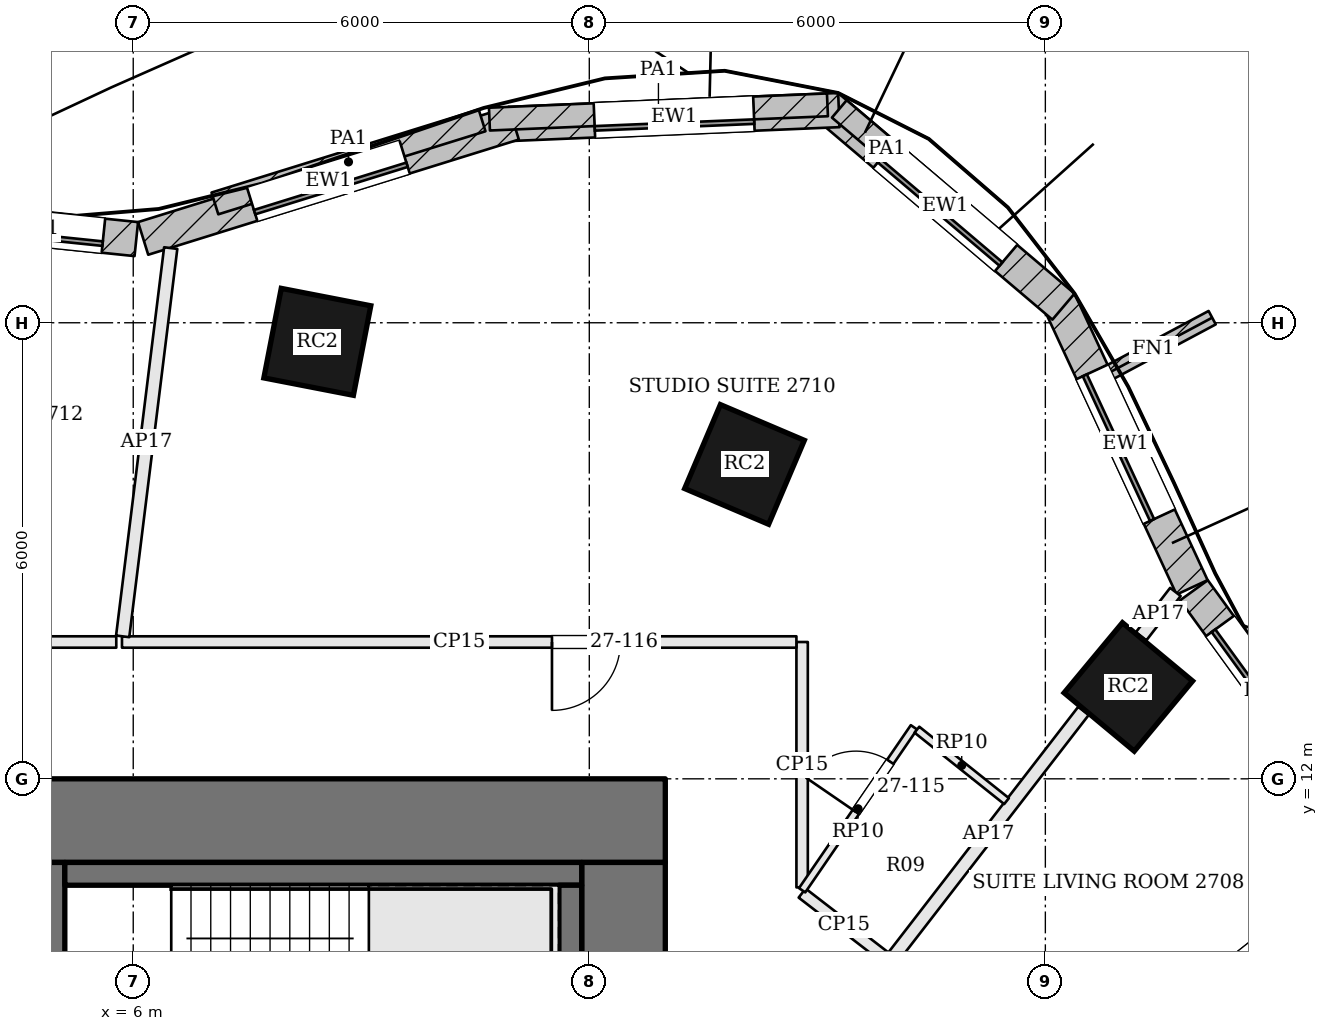
"""IFC4 building model, lengths in metres.
Left out: names, types, materials, properties, quantities, classifications, styles, units other than length and angle.
Written with IfcOpenShell. Run it as: python <this file> out.ifc"""

import sys

from ifc_helpers import new_model, si_unit, direction, frame, frame_2d, origin, origin_2d, place, context, subcontext, project, spatial, rectangle, extrude, element, fill, save


model = new_model("IFC4")
c1 = context("Model", 3, precision=1e-05, world=origin(), true_north=direction((0.0, 1.0)))
c2 = subcontext(c1, "Body", "Model", "MODEL_VIEW")
j1 = project(units=[si_unit("LENGTHUNIT", "METRE"), si_unit("PLANEANGLEUNIT", "RADIAN")], contexts=[c1])
p1 = place(None, origin())
s1 = spatial("IfcSite", under=j1, at=p1, CompositionType="ELEMENT")
p2 = place(p1, origin())
s2 = spatial("IfcBuilding", under=s1, at=p2, CompositionType="ELEMENT")
p3 = place(p2, frame((0.0, 0.0, 114.0)))
s3 = spatial("IfcBuildingStorey", under=s2, at=p3, CompositionType="ELEMENT", Elevation=114.0)
p4 = place(p3, frame((-13.0, 11.45, 0.0), z_axis=(0.0, 0.0, 1.0), x_axis=(1.0, 0.0, 0.0)))
e1 = element("IfcWall", 1, at=p4, inside=s3, PredefinedType="SHEAR", context=c2, shape_type="SweptSolid", body=[
    extrude(rectangle(XDim=26.0, YDim=1.1, at=frame_2d((13.0, 0.0))), origin(), (0.0, 0.0, 1.0), 3.6),
])
p5 = place(p4, frame((9.225, 0.0, 0.0)))
e2 = element("IfcOpeningElement", 2, at=p5, cuts=e1, PredefinedType="OPENING", context=c2, shape_type="SweptSolid", body=[
    extrude(rectangle(XDim=1.0, YDim=2.1, at=frame_2d((0.5, 1.05))), frame((0.0, 0.56, 0.0), z_axis=(0.0, -1.0, 0.0), x_axis=(1.0, 0.0, 0.0)), (0.0, 0.0, 1.0), 1.12),
])
p6 = place(p4, frame((11.825, 0.0, 0.0)))
e3 = element("IfcOpeningElement", 3, at=p6, cuts=e1, PredefinedType="OPENING", context=c2, shape_type="SweptSolid", body=[
    extrude(rectangle(XDim=0.7, YDim=2.1, at=frame_2d((0.35, 1.05))), frame((0.0, 0.56, 0.0), z_axis=(0.0, -1.0, 0.0), x_axis=(1.0, 0.0, 0.0)), (0.0, 0.0, 1.0), 1.12),
])
p7 = place(p4, frame((13.725, 0.0, 0.0)))
e4 = element("IfcOpeningElement", 4, at=p7, cuts=e1, PredefinedType="OPENING", context=c2, shape_type="SweptSolid", body=[
    extrude(rectangle(XDim=1.0, YDim=2.1, at=frame_2d((0.5, 1.05))), frame((0.0, 0.56, 0.0), z_axis=(0.0, -1.0, 0.0), x_axis=(1.0, 0.0, 0.0)), (0.0, 0.0, 1.0), 1.12),
])
p8 = place(p4, frame((16.225, 0.0, 0.0)))
e5 = element("IfcOpeningElement", 5, at=p8, cuts=e1, PredefinedType="OPENING", context=c2, shape_type="SweptSolid", body=[
    extrude(rectangle(XDim=0.9, YDim=2.1, at=frame_2d((0.45, 1.05))), frame((0.0, 0.56, 0.0), z_axis=(0.0, -1.0, 0.0), x_axis=(1.0, 0.0, 0.0)), (0.0, 0.0, 1.0), 1.12),
])
p9 = place(p3, frame((12.45, -1.9, 0.0), z_axis=(0.0, 0.0, 1.0), x_axis=(0.0, 1.0, 0.0)))
e6 = element("IfcWall", 6, at=p9, inside=s3, PredefinedType="SHEAR", context=c2, shape_type="SweptSolid", body=[
    extrude(rectangle(XDim=12.8, YDim=1.1, at=frame_2d((6.4, 0.0))), origin(), (0.0, 0.0, 1.0), 3.6),
])
p10 = place(p9, frame((7.1, 0.0, 0.0)))
e7 = element("IfcOpeningElement", 7, at=p10, cuts=e6, PredefinedType="OPENING", context=c2, shape_type="SweptSolid", body=[
    extrude(rectangle(XDim=1.8, YDim=2.1, at=frame_2d((0.9, 1.05))), frame((0.0, 0.56, 0.0), z_axis=(0.0, -1.0, 0.0), x_axis=(1.0, 0.0, 0.0)), (0.0, 0.0, 1.0), 1.12),
])
for number, where, z_axis, x_axis in (
    (8, (19.092, 13.209, 0.0), (0.0, 0.0, 1.0), (-0.769, 0.639, 0.0)),
    (9, (14.042, 16.136, 0.0), (0.0, 0.0, 1.0), (-0.92, 0.392, 0.0)),
    (10, (8.422, 17.749, 0.0), (0.0, 0.0, 1.0), (-0.982, 0.191, 0.0)),
):
    element("IfcColumn", number, at=place(p3, frame(where, z_axis=z_axis, x_axis=x_axis)), inside=s3, PredefinedType="COLUMN", context=c2, shape_type="SweptSolid", body=[
        extrude(rectangle(XDim=1.2, YDim=1.2, at=origin_2d()), origin(), (0.0, 0.0, 1.0), 3.6),
    ])
p11 = place(p3, frame((21.872, 11.841, 0.0), z_axis=(0.0, 0.0, 1.0), x_axis=(-0.587562050363, 0.809179113036, 0.0)))
e11 = element("IfcWall", 11, at=p11, inside=s3, PredefinedType="SOLIDWALL", context=c2, shape_type="SweptSolid", body=[
    extrude(rectangle(XDim=3.263, YDim=0.45, at=frame_2d((1.631, 0.0))), origin(), (0.0, 0.0, 1.0), 3.4),
])
p12 = place(p11, frame((0.582, 0.0, 0.9)))
e12 = element("IfcOpeningElement", 12, at=p12, cuts=e11, PredefinedType="OPENING", context=c2, shape_type="SweptSolid", body=[
    extrude(rectangle(XDim=2.1, YDim=2.0, at=frame_2d((1.05, 1.0))), frame((0.0, 0.235, 0.0), z_axis=(0.0, -1.0, 0.0), x_axis=(1.0, 0.0, 0.0)), (0.0, 0.0, 1.0), 0.47),
])
p13 = place(p3, frame((19.931, 14.519, 0.0), z_axis=(0.0, 0.0, 1.0), x_axis=(-0.421138964136, 0.906996126169, 0.0)))
e13 = element("IfcWall", 13, at=p13, inside=s3, PredefinedType="SOLIDWALL", context=c2, shape_type="SweptSolid", body=[
    extrude(rectangle(XDim=4.15, YDim=0.45, at=frame_2d((2.075, 0.0))), origin(), (0.0, 0.0, 1.0), 3.4),
])
p14 = place(p13, frame((1.025, 0.0, 0.9)))
e14 = element("IfcOpeningElement", 14, at=p14, cuts=e13, PredefinedType="OPENING", context=c2, shape_type="SweptSolid", body=[
    extrude(rectangle(XDim=2.1, YDim=2.0, at=frame_2d((1.05, 1.0))), frame((0.0, 0.235, 0.0), z_axis=(0.0, -1.0, 0.0), x_axis=(1.0, 0.0, 0.0)), (0.0, 0.0, 1.0), 0.47),
])
p15 = place(p3, frame((18.238, 18.212, 0.0), z_axis=(0.0, 0.0, 1.0), x_axis=(-0.762479604733, 0.647012250554, 0.0)))
e15 = element("IfcWall", 15, at=p15, inside=s3, PredefinedType="SOLIDWALL", context=c2, shape_type="SweptSolid", body=[
    extrude(rectangle(XDim=4.079, YDim=0.45, at=frame_2d((2.039, 0.0))), origin(), (0.0, 0.0, 1.0), 3.4),
])
p16 = place(p15, frame((0.99, 0.0, 0.9)))
e16 = element("IfcOpeningElement", 16, at=p16, cuts=e15, PredefinedType="OPENING", context=c2, shape_type="SweptSolid", body=[
    extrude(rectangle(XDim=2.1, YDim=2.0, at=frame_2d((1.05, 1.0))), frame((0.0, 0.235, 0.0), z_axis=(0.0, -1.0, 0.0), x_axis=(1.0, 0.0, 0.0)), (0.0, 0.0, 1.0), 0.47),
])
p17 = place(p3, frame((15.283, 20.798, 0.0), z_axis=(0.0, 0.0, 1.0), x_axis=(-0.999108814386, -0.042208731526, 0.0)))
e17 = element("IfcWall", 17, at=p17, inside=s3, PredefinedType="SOLIDWALL", context=c2, shape_type="SweptSolid", body=[
    extrude(rectangle(XDim=4.338, YDim=0.45, at=frame_2d((2.169, 0.0))), origin(), (0.0, 0.0, 1.0), 3.4),
])
p18 = place(p17, frame((1.119, 0.0, 0.9)))
e18 = element("IfcOpeningElement", 18, at=p18, cuts=e17, PredefinedType="OPENING", context=c2, shape_type="SweptSolid", body=[
    extrude(rectangle(XDim=2.1, YDim=2.0, at=frame_2d((1.05, 1.0))), frame((0.0, 0.235, 0.0), z_axis=(0.0, -1.0, 0.0), x_axis=(1.0, 0.0, 0.0)), (0.0, 0.0, 1.0), 0.47),
])
p19 = place(p3, frame((11.007, 20.625, 0.0), z_axis=(0.0, 0.0, 1.0), x_axis=(-0.954949254112, -0.296769139352, 0.0)))
e19 = element("IfcWall", 19, at=p19, inside=s3, PredefinedType="SOLIDWALL", context=c2, shape_type="SweptSolid", body=[
    extrude(rectangle(XDim=5.106, YDim=0.45, at=frame_2d((2.553, 0.0))), origin(), (0.0, 0.0, 1.0), 3.4),
])
p20 = place(p19, frame((1.503, 0.0, 0.9)))
e20 = element("IfcOpeningElement", 20, at=p20, cuts=e19, PredefinedType="OPENING", context=c2, shape_type="SweptSolid", body=[
    extrude(rectangle(XDim=2.1, YDim=2.0, at=frame_2d((1.05, 1.0))), frame((0.0, 0.235, 0.0), z_axis=(0.0, -1.0, 0.0), x_axis=(1.0, 0.0, 0.0)), (0.0, 0.0, 1.0), 0.47),
])
p21 = place(p3, frame((6.04, 19.101, 0.0), z_axis=(0.0, 0.0, 1.0), x_axis=(-0.994675968472, 0.103052014752, 0.0)))
e21 = element("IfcWall", 21, at=p21, inside=s3, PredefinedType="SOLIDWALL", context=c2, shape_type="SweptSolid", body=[
    extrude(rectangle(XDim=2.67, YDim=0.45, at=frame_2d((1.335, 0.0))), origin(), (0.0, 0.0, 1.0), 3.4),
])
p22 = place(p21, frame((0.435, 0.0, 0.9)))
e22 = element("IfcOpeningElement", 22, at=p22, cuts=e21, PredefinedType="OPENING", context=c2, shape_type="SweptSolid", body=[
    extrude(rectangle(XDim=1.8, YDim=2.0, at=frame_2d((0.9, 1.0))), frame((0.0, 0.235, 0.0), z_axis=(0.0, -1.0, 0.0), x_axis=(1.0, 0.0, 0.0)), (0.0, 0.0, 1.0), 0.47),
])
p23 = place(p3, frame((18.651, 17.243, 0.0), z_axis=(0.0, 0.0, 1.0), x_axis=(0.882225472329, 0.470827161466, 0.0)))
e23 = element("IfcWall", 23, at=p23, inside=s3, PredefinedType="SOLIDWALL", context=c2, shape_type="SweptSolid", body=[
    extrude(rectangle(XDim=1.75, YDim=0.2, at=frame_2d((0.875, 0.0))), origin(), (0.0, 0.0, 1.0), 3.4),
])
p24 = place(p3, frame((16.542, 19.75, 3.6), z_axis=(0.0, 0.0, 1.0), x_axis=(-0.762426907318, 0.647074347349, 0.0)))
e24 = element("IfcWall", 24, at=p24, inside=s3, PredefinedType="PARAPET", context=c2, shape_type="SweptSolid", body=[
    extrude(rectangle(XDim=1.642, YDim=0.3, at=frame_2d((0.821, 0.0))), origin(), (0.0, 0.0, 1.0), 1.1),
])
p25 = place(p3, frame((15.133, 20.867, 3.6), z_axis=(0.0, 0.0, 1.0), x_axis=(-0.999109914186, -0.042182690458, 0.0)))
e25 = element("IfcWall", 25, at=p25, inside=s3, PredefinedType="PARAPET", context=c2, shape_type="SweptSolid", body=[
    extrude(rectangle(XDim=4.451, YDim=0.3, at=frame_2d((2.225, 0.0))), origin(), (0.0, 0.0, 1.0), 1.1),
])
p26 = place(p3, frame((10.59, 20.662, 3.6), z_axis=(0.0, 0.0, 1.0), x_axis=(-0.954933257017, -0.296820610207, 0.0)))
e26 = element("IfcWall", 26, at=p26, inside=s3, PredefinedType="PARAPET", context=c2, shape_type="SweptSolid", body=[
    extrude(rectangle(XDim=3.681, YDim=0.3, at=frame_2d((1.84, 0.0))), origin(), (0.0, 0.0, 1.0), 1.1),
])
p27 = place(p3, frame((4.975, 10.9, 0.0), z_axis=(0.0, 0.0, 1.0), x_axis=(0.0, -1.0, 0.0)))
e27 = element("IfcWall", 27, at=p27, inside=s3, PredefinedType="SOLIDWALL", context=c2, shape_type="SweptSolid", body=[
    extrude(rectangle(XDim=12.8, YDim=0.25, at=frame_2d((6.4, 0.0))), origin(), (0.0, 0.0, 1.0), 3.4),
])
p28 = place(p27, frame((4.95, 0.0, 0.0)))
e28 = element("IfcOpeningElement", 28, at=p28, cuts=e27, PredefinedType="OPENING", context=c2, shape_type="SweptSolid", body=[
    extrude(rectangle(XDim=1.2, YDim=2.1, at=frame_2d((0.6, 1.05))), frame((0.0, 0.135, 0.0), z_axis=(0.0, -1.0, 0.0), x_axis=(1.0, 0.0, 0.0)), (0.0, 0.0, 1.0), 0.27),
])
p29 = place(p3, frame((11.9, 10.75, 0.0), z_axis=(0.0, 0.0, 1.0), x_axis=(-1.0, 0.0, 0.0)))
e29 = element("IfcWall", 29, at=p29, inside=s3, PredefinedType="SOLIDWALL", context=c2, shape_type="SweptSolid", body=[
    extrude(rectangle(XDim=6.8, YDim=0.3, at=frame_2d((3.4, 0.0))), origin(), (0.0, 0.0, 1.0), 3.4),
])
p30 = place(p3, frame((11.75, 10.6, 0.0), z_axis=(0.0, 0.0, 1.0), x_axis=(0.0, -1.0, 0.0)))
e30 = element("IfcWall", 30, at=p30, inside=s3, PredefinedType="SOLIDWALL", context=c2, shape_type="SweptSolid", body=[
    extrude(rectangle(XDim=2.95, YDim=0.3, at=frame_2d((1.475, 0.0))), origin(), (0.0, 0.0, 1.0), 3.4),
])
p31 = place(p3, frame((19.711, 14.458, 0.0), z_axis=(0.0, 0.0, 1.0), x_axis=(-0.611598358188, -0.791168407017, 0.0)))
e31 = element("IfcWall", 31, at=p31, inside=s3, PredefinedType="PARTITIONING", context=c2, shape_type="SweptSolid", body=[
    extrude(rectangle(XDim=0.737, YDim=0.175, at=frame_2d((0.368, 0.0))), origin(), (0.0, 0.0, 1.0), 2.784),
])
p32 = place(p3, frame((18.501, 12.894, 0.0), z_axis=(0.0, 0.0, 1.0), x_axis=(-0.611500237987, -0.791244247335, 0.0)))
e32 = element("IfcWall", 32, at=p32, inside=s3, PredefinedType="PARTITIONING", context=c2, shape_type="SweptSolid", body=[
    extrude(rectangle(XDim=4.084, YDim=0.175, at=frame_2d((2.042, 0.0))), origin(), (0.0, 0.0, 1.0), 2.784),
])
p33 = place(p3, frame((15.899, 9.649, 0.0), z_axis=(0.0, 0.0, 1.0), x_axis=(-0.791563451323, 0.611086984421, 0.0)))
e33 = element("IfcWall", 33, at=p33, inside=s3, PredefinedType="PARTITIONING", context=c2, shape_type="SweptSolid", body=[
    extrude(rectangle(XDim=1.388, YDim=0.15, at=frame_2d((0.694, 0.0))), origin(), (0.0, 0.0, 1.0), 2.784),
])
p34 = place(p3, frame((14.8, 10.572, 0.0), z_axis=(0.0, 0.0, 1.0), x_axis=(0.0, 1.0, 0.0)))
e34 = element("IfcWall", 34, at=p34, inside=s3, PredefinedType="PARTITIONING", context=c2, shape_type="SweptSolid", body=[
    extrude(rectangle(XDim=3.228, YDim=0.15, at=frame_2d((1.614, 0.0))), origin(), (0.0, 0.0, 1.0), 2.784),
])
p35 = place(p3, frame((14.725, 13.8, 0.0), z_axis=(0.0, 0.0, 1.0), x_axis=(-1.0, 0.0, 0.0)))
e35 = element("IfcWall", 35, at=p35, inside=s3, PredefinedType="PARTITIONING", context=c2, shape_type="SweptSolid", body=[
    extrude(rectangle(XDim=8.873, YDim=0.15, at=frame_2d((4.437, 0.0))), origin(), (0.0, 0.0, 1.0), 2.784),
])
p36 = place(p35, frame((2.316, 0.0, 0.0)))
e36 = element("IfcOpeningElement", 36, at=p36, cuts=e35, PredefinedType="OPENING", context=c2, shape_type="SweptSolid", body=[
    extrude(rectangle(XDim=0.9, YDim=2.4, at=frame_2d((0.45, 1.2))), frame((0.0, 0.085, 0.0), z_axis=(0.0, -1.0, 0.0), x_axis=(1.0, 0.0, 0.0)), (0.0, 0.0, 1.0), 0.17),
])
p37 = place(p3, frame((6.493, 18.982, 0.0), z_axis=(0.0, 0.0, 1.0), x_axis=(-0.122808633413, -0.992430370131, 0.0)))
e37 = element("IfcWall", 37, at=p37, inside=s3, PredefinedType="PARTITIONING", context=c2, shape_type="SweptSolid", body=[
    extrude(rectangle(XDim=5.147, YDim=0.175, at=frame_2d((2.573, 0.0))), origin(), (0.0, 0.0, 1.0), 2.784),
])
p38 = place(p3, frame((5.777, 13.8, 0.0), z_axis=(0.0, 0.0, 1.0), x_axis=(-1.0, 0.0, 0.0)))
e38 = element("IfcWall", 38, at=p38, inside=s3, PredefinedType="PARTITIONING", context=c2, shape_type="SweptSolid", body=[
    extrude(rectangle(XDim=11.824, YDim=0.15, at=frame_2d((5.912, 0.0))), origin(), (0.0, 0.0, 1.0), 2.784),
])
p39 = place(p38, frame((8.402, 0.0, 0.0)))
e39 = element("IfcOpeningElement", 39, at=p39, cuts=e38, PredefinedType="OPENING", context=c2, shape_type="SweptSolid", body=[
    extrude(rectangle(XDim=1.0, YDim=2.1, at=frame_2d((0.5, 1.05))), frame((0.0, 0.085, 0.0), z_axis=(0.0, -1.0, 0.0), x_axis=(1.0, 0.0, 0.0)), (0.0, 0.0, 1.0), 0.17),
])
p40 = place(p3, frame((22.47, 11.188, 0.0), z_axis=(0.0, 0.0, 1.0), x_axis=(-0.784826732548, -0.619715257096, 0.0)))
e40 = element("IfcWall", 40, at=p40, inside=s3, PredefinedType="PARTITIONING", context=c2, shape_type="SweptSolid", body=[
    extrude(rectangle(XDim=5.688, YDim=0.1, at=frame_2d((2.844, 0.0))), origin(), (0.0, 0.0, 1.0), 2.884),
])
p41 = place(p40, frame((1.613, 0.0, 0.0)))
e41 = element("IfcOpeningElement", 41, at=p41, cuts=e40, PredefinedType="OPENING", context=c2, shape_type="SweptSolid", body=[
    extrude(rectangle(XDim=0.9, YDim=2.4, at=frame_2d((0.45, 1.2))), frame((0.0, 0.06, 0.0), z_axis=(0.0, -1.0, 0.0), x_axis=(1.0, 0.0, 0.0)), (0.0, 0.0, 1.0), 0.12),
])
p42 = place(p3, frame((14.8, 10.534, 0.0), z_axis=(0.0, 0.0, 1.0), x_axis=(0.565831232007, 0.824521083348, 0.0)))
e42 = element("IfcWall", 42, at=p42, inside=s3, PredefinedType="PARTITIONING", context=c2, shape_type="SweptSolid", body=[
    extrude(rectangle(XDim=2.6, YDim=0.1, at=frame_2d((1.3, 0.0))), origin(), (0.0, 0.0, 1.0), 2.884),
])
p43 = place(p42, frame((1.25, 0.0, 0.0)))
e43 = element("IfcOpeningElement", 43, at=p43, cuts=e42, PredefinedType="OPENING", context=c2, shape_type="SweptSolid", body=[
    extrude(rectangle(XDim=0.8, YDim=2.1, at=frame_2d((0.4, 1.05))), frame((0.0, 0.06, 0.0), z_axis=(0.0, -1.0, 0.0), x_axis=(1.0, 0.0, 0.0)), (0.0, 0.0, 1.0), 0.12),
])
p44 = place(p3, frame((16.31, 12.646, 0.0), z_axis=(0.0, 0.0, 1.0), x_axis=(0.781989254078, -0.623291911151, 0.0)))
e44 = element("IfcWall", 44, at=p44, inside=s3, PredefinedType="PARTITIONING", context=c2, shape_type="SweptSolid", body=[
    extrude(rectangle(XDim=1.508, YDim=0.1, at=frame_2d((0.754, 0.0))), origin(), (0.0, 0.0, 1.0), 2.884),
])
p45 = place(p12, origin())
e45 = element("IfcWindow", 45, at=p45, inside=s3, PartitioningType="SINGLE_PANEL", PredefinedType="WINDOW", context=c2, shape_type="SweptSolid", body=[
    extrude(rectangle(XDim=2.1, YDim=2.0, at=frame_2d((1.05, 1.0))), frame((0.0, 0.135, 0.0), z_axis=(0.0, -1.0, 0.0), x_axis=(1.0, 0.0, 0.0)), (0.0, 0.0, 1.0), 0.06),
])
fill(e12, e45)
p46 = place(p14, origin())
e46 = element("IfcWindow", 46, at=p46, inside=s3, PartitioningType="SINGLE_PANEL", PredefinedType="WINDOW", context=c2, shape_type="SweptSolid", body=[
    extrude(rectangle(XDim=2.1, YDim=2.0, at=frame_2d((1.05, 1.0))), frame((0.0, 0.135, 0.0), z_axis=(0.0, -1.0, 0.0), x_axis=(1.0, 0.0, 0.0)), (0.0, 0.0, 1.0), 0.06),
])
fill(e14, e46)
p47 = place(p16, origin())
e47 = element("IfcWindow", 47, at=p47, inside=s3, PartitioningType="SINGLE_PANEL", PredefinedType="WINDOW", context=c2, shape_type="SweptSolid", body=[
    extrude(rectangle(XDim=2.1, YDim=2.0, at=frame_2d((1.05, 1.0))), frame((0.0, 0.135, 0.0), z_axis=(0.0, -1.0, 0.0), x_axis=(1.0, 0.0, 0.0)), (0.0, 0.0, 1.0), 0.06),
])
fill(e16, e47)
p48 = place(p18, origin())
e48 = element("IfcWindow", 48, at=p48, inside=s3, PartitioningType="SINGLE_PANEL", PredefinedType="WINDOW", context=c2, shape_type="SweptSolid", body=[
    extrude(rectangle(XDim=2.1, YDim=2.0, at=frame_2d((1.05, 1.0))), frame((0.0, 0.135, 0.0), z_axis=(0.0, -1.0, 0.0), x_axis=(1.0, 0.0, 0.0)), (0.0, 0.0, 1.0), 0.06),
])
fill(e18, e48)
p49 = place(p20, origin())
e49 = element("IfcWindow", 49, at=p49, inside=s3, PartitioningType="SINGLE_PANEL", PredefinedType="WINDOW", context=c2, shape_type="SweptSolid", body=[
    extrude(rectangle(XDim=2.1, YDim=2.0, at=frame_2d((1.05, 1.0))), frame((0.0, 0.135, 0.0), z_axis=(0.0, -1.0, 0.0), x_axis=(1.0, 0.0, 0.0)), (0.0, 0.0, 1.0), 0.06),
])
fill(e20, e49)
p50 = place(p22, origin())
e50 = element("IfcWindow", 50, at=p50, inside=s3, PartitioningType="SINGLE_PANEL", PredefinedType="WINDOW", context=c2, shape_type="SweptSolid", body=[
    extrude(rectangle(XDim=1.8, YDim=2.0, at=frame_2d((0.9, 1.0))), frame((0.0, 0.135, 0.0), z_axis=(0.0, -1.0, 0.0), x_axis=(1.0, 0.0, 0.0)), (0.0, 0.0, 1.0), 0.06),
])
fill(e22, e50)
p51 = place(p41, origin())
e51 = element("IfcDoor", 51, at=p51, inside=s3, OperationType="SINGLE_SWING_LEFT", PredefinedType="DOOR", context=c2, shape_type="SweptSolid", body=[
    extrude(rectangle(XDim=0.9, YDim=2.4, at=frame_2d((0.45, 1.2))), frame((0.0, 0.025, 0.0), z_axis=(0.0, -1.0, 0.0), x_axis=(1.0, 0.0, 0.0)), (0.0, 0.0, 1.0), 0.05),
])
fill(e41, e51)
p52 = place(p43, origin())
e52 = element("IfcDoor", 52, at=p52, inside=s3, OperationType="SINGLE_SWING_LEFT", PredefinedType="DOOR", context=c2, shape_type="SweptSolid", body=[
    extrude(rectangle(XDim=0.8, YDim=2.1, at=frame_2d((0.4, 1.05))), frame((0.0, 0.025, 0.0), z_axis=(0.0, -1.0, 0.0), x_axis=(1.0, 0.0, 0.0)), (0.0, 0.0, 1.0), 0.05),
])
fill(e43, e52)
p53 = place(p36, origin())
e53 = element("IfcDoor", 53, at=p53, inside=s3, OperationType="SINGLE_SWING_RIGHT", PredefinedType="DOOR", context=c2, shape_type="SweptSolid", body=[
    extrude(rectangle(XDim=0.9, YDim=2.4, at=frame_2d((0.45, 1.2))), frame((0.0, 0.025, 0.0), z_axis=(0.0, -1.0, 0.0), x_axis=(1.0, 0.0, 0.0)), (0.0, 0.0, 1.0), 0.05),
])
fill(e36, e53)
save(model, sys.argv[1])
